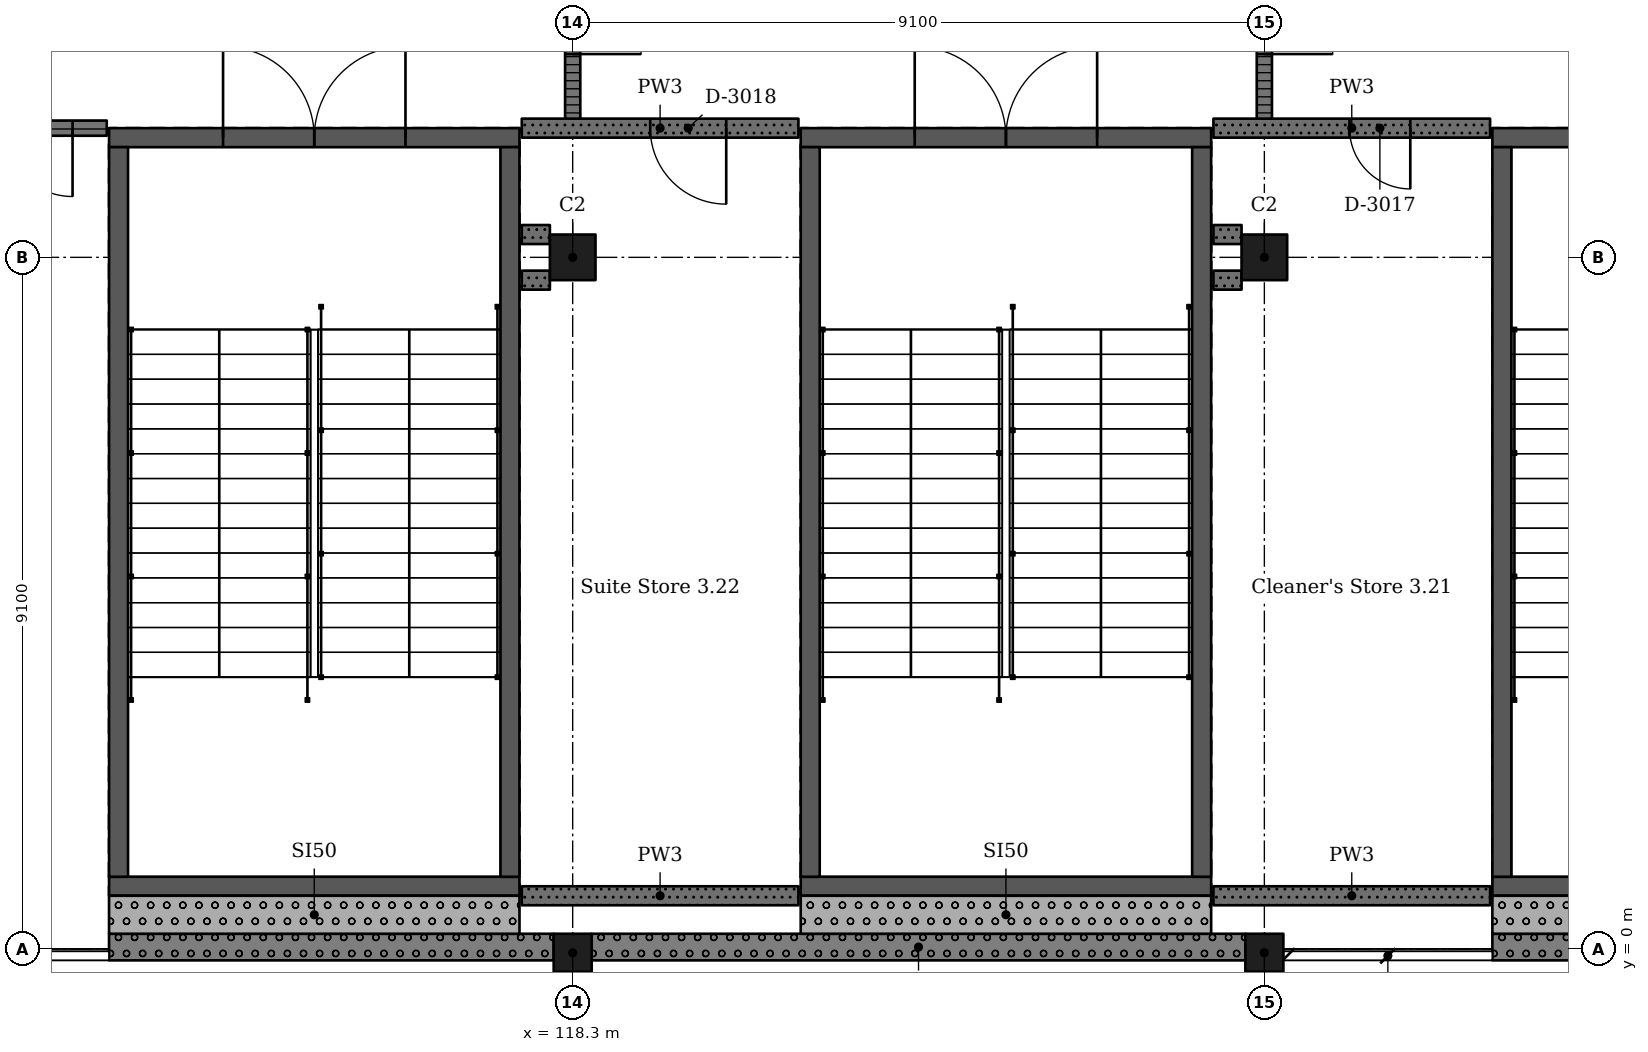
"""IFC4 building model, lengths in metres.
Left out: names, types, materials, properties, quantities, classifications, styles, units other than length and angle.
Written with IfcOpenShell. Run it as: python <this file> out.ifc"""

import sys

from ifc_helpers import new_model, si_unit, direction, frame, frame_2d, origin, origin_2d, place, context, subcontext, project, spatial, rectangle, extrude, element, fill, save


model = new_model("IFC4")
c1 = context("Model", 3, precision=1e-05, world=origin(), true_north=direction((0.0, 1.0)))
c2 = subcontext(c1, "Body", "Model", "MODEL_VIEW")
j1 = project(units=[si_unit("LENGTHUNIT", "METRE"), si_unit("PLANEANGLEUNIT", "RADIAN")], contexts=[c1])
p1 = place(None, origin())
s1 = spatial("IfcSite", under=j1, at=p1, CompositionType="ELEMENT")
p2 = place(p1, origin())
s2 = spatial("IfcBuilding", under=s1, at=p2, CompositionType="ELEMENT")
p3 = place(p2, frame((0.0, 0.0, 15.47)))
s3 = spatial("IfcBuildingStorey", under=s2, at=p3, CompositionType="ELEMENT", Elevation=15.47)
p4 = place(p3, frame((118.3, -0.05, 0.0), z_axis=(0.0, 0.0, 1.0), x_axis=(1.0, 0.0, 0.0)))
e1 = element("IfcColumn", 1, at=p4, inside=s3, PredefinedType="COLUMN", context=c2, shape_type="SweptSolid", body=[
    extrude(rectangle(XDim=0.5, YDim=0.5, at=origin_2d()), origin(), (0.0, 0.0, 1.0), 4.55),
])
p5 = place(p3, frame((118.3, 9.1, 0.0), z_axis=(0.0, 0.0, 1.0), x_axis=(1.0, 0.0, 0.0)))
e2 = element("IfcColumn", 2, at=p5, inside=s3, PredefinedType="COLUMN", context=c2, shape_type="SweptSolid", body=[
    extrude(rectangle(XDim=0.6, YDim=0.6, at=origin_2d()), origin(), (0.0, 0.0, 1.0), 4.55),
])
p6 = place(p3, frame((127.4, -0.05, 0.0), z_axis=(0.0, 0.0, 1.0), x_axis=(1.0, 0.0, 0.0)))
e3 = element("IfcColumn", 3, at=p6, inside=s3, PredefinedType="COLUMN", context=c2, shape_type="SweptSolid", body=[
    extrude(rectangle(XDim=0.5, YDim=0.5, at=origin_2d()), origin(), (0.0, 0.0, 1.0), 4.55),
])
p7 = place(p3, frame((127.4, 9.1, 0.0), z_axis=(0.0, 0.0, 1.0), x_axis=(1.0, 0.0, 0.0)))
e4 = element("IfcColumn", 4, at=p7, inside=s3, PredefinedType="COLUMN", context=c2, shape_type="SweptSolid", body=[
    extrude(rectangle(XDim=0.6, YDim=0.6, at=origin_2d()), origin(), (0.0, 0.0, 1.0), 4.55),
])
p8 = place(p3, frame((135.8, 0.825, 0.0), z_axis=(0.0, 0.0, 1.0), x_axis=(-1.0, 0.0, 0.0)))
e5 = element("IfcWall", 5, at=p8, inside=s3, PredefinedType="SHEAR", context=c2, shape_type="SweptSolid", body=[
    extrude(rectangle(XDim=5.4, YDim=0.25, at=frame_2d((2.7, 0.0))), origin(), (0.0, 0.0, 1.0), 4.55),
])
p9 = place(p3, frame((135.8, 10.675, 0.0), z_axis=(0.0, 0.0, 1.0), x_axis=(-1.0, 0.0, 0.0)))
e6 = element("IfcWall", 6, at=p9, inside=s3, PredefinedType="SHEAR", context=c2, shape_type="SweptSolid", body=[
    extrude(rectangle(XDim=5.4, YDim=0.25, at=frame_2d((2.7, 0.0))), origin(), (0.0, 0.0, 1.0), 4.55),
])
p10 = place(p9, frame((1.5, 0.0, 0.0)))
e7 = element("IfcOpeningElement", 7, at=p10, cuts=e6, PredefinedType="OPENING", context=c2, shape_type="SweptSolid", body=[
    extrude(rectangle(XDim=2.4, YDim=2.1, at=frame_2d((1.2, 1.05))), frame((0.0, 0.135, 0.0), z_axis=(0.0, -1.0, 0.0), x_axis=(1.0, 0.0, 0.0)), (0.0, 0.0, 1.0), 0.27),
])
p11 = place(p3, frame((130.525, 10.55, 0.0), z_axis=(0.0, 0.0, 1.0), x_axis=(0.0, -1.0, 0.0)))
e8 = element("IfcWall", 8, at=p11, inside=s3, PredefinedType="SHEAR", context=c2, shape_type="SweptSolid", body=[
    extrude(rectangle(XDim=9.6, YDim=0.25, at=frame_2d((4.8, 0.0))), origin(), (0.0, 0.0, 1.0), 4.55),
])
p12 = place(p3, frame((126.7, 0.825, 0.0), z_axis=(0.0, 0.0, 1.0), x_axis=(-1.0, 0.0, 0.0)))
e9 = element("IfcWall", 9, at=p12, inside=s3, PredefinedType="SHEAR", context=c2, shape_type="SweptSolid", body=[
    extrude(rectangle(XDim=5.4, YDim=0.25, at=frame_2d((2.7, 0.0))), origin(), (0.0, 0.0, 1.0), 4.55),
])
p13 = place(p3, frame((126.7, 10.675, 0.0), z_axis=(0.0, 0.0, 1.0), x_axis=(-1.0, 0.0, 0.0)))
e10 = element("IfcWall", 10, at=p13, inside=s3, PredefinedType="SHEAR", context=c2, shape_type="SweptSolid", body=[
    extrude(rectangle(XDim=5.4, YDim=0.25, at=frame_2d((2.7, 0.0))), origin(), (0.0, 0.0, 1.0), 4.55),
])
p14 = place(p13, frame((1.5, 0.0, 0.0)))
e11 = element("IfcOpeningElement", 11, at=p14, cuts=e10, PredefinedType="OPENING", context=c2, shape_type="SweptSolid", body=[
    extrude(rectangle(XDim=2.4, YDim=2.1, at=frame_2d((1.2, 1.05))), frame((0.0, 0.135, 0.0), z_axis=(0.0, -1.0, 0.0), x_axis=(1.0, 0.0, 0.0)), (0.0, 0.0, 1.0), 0.27),
])
for number, where, z_axis, x_axis in (
    (12, (121.425, 10.55, 0.0), (0.0, 0.0, 1.0), (0.0, -1.0, 0.0)),
    (13, (126.575, 10.55, 0.0), (0.0, 0.0, 1.0), (0.0, -1.0, 0.0)),
):
    element("IfcWall", number, at=place(p3, frame(where, z_axis=z_axis, x_axis=x_axis)), inside=s3, PredefinedType="SHEAR", context=c2, shape_type="SweptSolid", body=[
        extrude(rectangle(XDim=9.6, YDim=0.25, at=frame_2d((4.8, 0.0))), origin(), (0.0, 0.0, 1.0), 4.55),
    ])
p15 = place(p3, frame((117.6, 0.825, 0.0), z_axis=(0.0, 0.0, 1.0), x_axis=(-1.0, 0.0, 0.0)))
e14 = element("IfcWall", 14, at=p15, inside=s3, PredefinedType="SHEAR", context=c2, shape_type="SweptSolid", body=[
    extrude(rectangle(XDim=5.4, YDim=0.25, at=frame_2d((2.7, 0.0))), origin(), (0.0, 0.0, 1.0), 4.55),
])
p16 = place(p3, frame((117.6, 10.675, 0.0), z_axis=(0.0, 0.0, 1.0), x_axis=(-1.0, 0.0, 0.0)))
e15 = element("IfcWall", 15, at=p16, inside=s3, PredefinedType="SHEAR", context=c2, shape_type="SweptSolid", body=[
    extrude(rectangle(XDim=5.4, YDim=0.25, at=frame_2d((2.7, 0.0))), origin(), (0.0, 0.0, 1.0), 4.55),
])
p17 = place(p16, frame((1.5, 0.0, 0.0)))
e16 = element("IfcOpeningElement", 16, at=p17, cuts=e15, PredefinedType="OPENING", context=c2, shape_type="SweptSolid", body=[
    extrude(rectangle(XDim=2.4, YDim=2.1, at=frame_2d((1.2, 1.05))), frame((0.0, 0.135, 0.0), z_axis=(0.0, -1.0, 0.0), x_axis=(1.0, 0.0, 0.0)), (0.0, 0.0, 1.0), 0.27),
])
for number, where, z_axis, x_axis in (
    (17, (112.325, 10.55, 0.0), (0.0, 0.0, 1.0), (0.0, -1.0, 0.0)),
    (18, (117.475, 10.55, 0.0), (0.0, 0.0, 1.0), (0.0, -1.0, 0.0)),
):
    element("IfcWall", number, at=place(p3, frame(where, z_axis=z_axis, x_axis=x_axis)), inside=s3, PredefinedType="SHEAR", context=c2, shape_type="SweptSolid", body=[
        extrude(rectangle(XDim=9.6, YDim=0.25, at=frame_2d((4.8, 0.0))), origin(), (0.0, 0.0, 1.0), 4.55),
    ])
p18 = place(p3, frame((112.2, 0.025, 0.0), z_axis=(0.0, 0.0, 1.0), x_axis=(1.0, 0.0, 0.0)))
e19 = element("IfcWall", 19, at=p18, inside=s3, PredefinedType="SOLIDWALL", context=c2, shape_type="SweptSolid", body=[
    extrude(rectangle(XDim=5.85, YDim=0.35, at=frame_2d((2.925, 0.0))), origin(), (0.0, 0.0, 1.0), 3.55),
])
p19 = place(p3, frame((118.55, 0.025, 0.0), z_axis=(0.0, 0.0, 1.0), x_axis=(1.0, 0.0, 0.0)))
e20 = element("IfcWall", 20, at=p19, inside=s3, PredefinedType="SOLIDWALL", context=c2, shape_type="SweptSolid", body=[
    extrude(rectangle(XDim=8.6, YDim=0.35, at=frame_2d((4.3, 0.0))), origin(), (0.0, 0.0, 1.0), 3.55),
])
p20 = place(p3, frame((130.4, 0.025, 0.0), z_axis=(0.0, 0.0, 1.0), x_axis=(1.0, 0.0, 0.0)))
e21 = element("IfcWall", 21, at=p20, inside=s3, PredefinedType="SOLIDWALL", context=c2, shape_type="SweptSolid", body=[
    extrude(rectangle(XDim=5.85, YDim=0.35, at=frame_2d((2.925, 0.0))), origin(), (0.0, 0.0, 1.0), 3.55),
])
p21 = place(p3, frame((130.4, 0.45, 0.0), z_axis=(0.0, 0.0, 1.0), x_axis=(1.0, 0.0, 0.0)))
e22 = element("IfcWall", 22, at=p21, inside=s3, PredefinedType="SOLIDWALL", context=c2, shape_type="SweptSolid", body=[
    extrude(rectangle(XDim=5.4, YDim=0.5, at=frame_2d((2.7, 0.0))), origin(), (0.0, 0.0, 1.0), 4.3),
])
p22 = place(p3, frame((121.3, 0.45, 0.0), z_axis=(0.0, 0.0, 1.0), x_axis=(1.0, 0.0, 0.0)))
e23 = element("IfcWall", 23, at=p22, inside=s3, PredefinedType="SOLIDWALL", context=c2, shape_type="SweptSolid", body=[
    extrude(rectangle(XDim=5.4, YDim=0.5, at=frame_2d((2.7, 0.0))), origin(), (0.0, 0.0, 1.0), 4.3),
])
p23 = place(p3, frame((112.2, 0.45, 0.0), z_axis=(0.0, 0.0, 1.0), x_axis=(1.0, 0.0, 0.0)))
e24 = element("IfcWall", 24, at=p23, inside=s3, PredefinedType="SOLIDWALL", context=c2, shape_type="SweptSolid", body=[
    extrude(rectangle(XDim=5.4, YDim=0.5, at=frame_2d((2.7, 0.0))), origin(), (0.0, 0.0, 1.0), 4.3),
])
p24 = place(p3, frame((112.17, 10.8, 0.0), z_axis=(0.0, 0.0, 1.0), x_axis=(-1.0, 0.0, 0.0)))
e25 = element("IfcWall", 25, at=p24, inside=s3, PredefinedType="PARTITIONING", context=c2, shape_type="SweptSolid", body=[
    extrude(rectangle(XDim=2.745, YDim=0.2, at=frame_2d((1.373, 0.0))), origin(), (0.0, 0.0, 1.0), 4.3),
])
p25 = place(p24, frame((0.45, 0.0, 0.0)))
e26 = element("IfcOpeningElement", 26, at=p25, cuts=e25, PredefinedType="OPENING", context=c2, shape_type="SweptSolid", body=[
    extrude(rectangle(XDim=1.8, YDim=2.4, at=frame_2d((0.9, 1.2))), frame((0.0, 0.11, 0.0), z_axis=(0.0, -1.0, 0.0), x_axis=(1.0, 0.0, 0.0)), (0.0, 0.0, 1.0), 0.22),
])
for number, where, z_axis, x_axis in (
    (27, (117.63, 8.8, 0.0), (0.0, 0.0, 1.0), (1.0, 0.0, 0.0)),
    (28, (118.0, 9.4, 0.0), (0.0, 0.0, 1.0), (-1.0, 0.0, 0.0)),
):
    element("IfcWall", number, at=place(p3, frame(where, z_axis=z_axis, x_axis=x_axis)), inside=s3, PredefinedType="SOLIDWALL", context=c2, shape_type="SweptSolid", body=[
        extrude(rectangle(XDim=0.37, YDim=0.25, at=frame_2d((0.185, 0.0))), origin(), (0.0, 0.0, 1.0), 4.3),
    ])
p26 = place(p3, frame((117.63, 10.8, 0.0), z_axis=(0.0, 0.0, 1.0), x_axis=(1.0, 0.0, 0.0)))
e29 = element("IfcWall", 29, at=p26, inside=s3, PredefinedType="SOLIDWALL", context=c2, shape_type="SweptSolid", body=[
    extrude(rectangle(XDim=3.64, YDim=0.25, at=frame_2d((1.82, 0.0))), origin(), (0.0, 0.0, 1.0), 4.3),
])
p27 = place(p26, frame((1.69, 0.0, 0.0)))
e30 = element("IfcOpeningElement", 30, at=p27, cuts=e29, PredefinedType="OPENING", context=c2, shape_type="SweptSolid", body=[
    extrude(rectangle(XDim=1.0, YDim=2.1, at=frame_2d((0.5, 1.05))), frame((0.0, 0.135, 0.0), z_axis=(0.0, -1.0, 0.0), x_axis=(1.0, 0.0, 0.0)), (0.0, 0.0, 1.0), 0.27),
])
p28 = place(p3, frame((118.3, 10.925, 0.0), z_axis=(0.0, 0.0, 1.0), x_axis=(0.0, 1.0, 0.0)))
e31 = element("IfcWall", 31, at=p28, inside=s3, PredefinedType="PARTITIONING", context=c2, shape_type="SweptSolid", body=[
    extrude(rectangle(XDim=6.925, YDim=0.2, at=frame_2d((3.462, 0.0))), origin(), (0.0, 0.0, 1.0), 3.55),
])
p29 = place(p28, frame((0.85, 0.0, 0.0)))
e32 = element("IfcOpeningElement", 32, at=p29, cuts=e31, PredefinedType="OPENING", context=c2, shape_type="SweptSolid", body=[
    extrude(rectangle(XDim=1.8, YDim=2.4, at=frame_2d((0.9, 1.2))), frame((0.0, 0.11, 0.0), z_axis=(0.0, -1.0, 0.0), x_axis=(1.0, 0.0, 0.0)), (0.0, 0.0, 1.0), 0.22),
])
p30 = place(p28, frame((4.25, 0.0, 0.0)))
e33 = element("IfcOpeningElement", 33, at=p30, cuts=e31, PredefinedType="OPENING", context=c2, shape_type="SweptSolid", body=[
    extrude(rectangle(XDim=1.8, YDim=2.4, at=frame_2d((0.9, 1.2))), frame((0.0, 0.11, 0.0), z_axis=(0.0, -1.0, 0.0), x_axis=(1.0, 0.0, 0.0)), (0.0, 0.0, 1.0), 0.22),
])
p31 = place(p3, frame((121.27, 0.7, 0.0), z_axis=(0.0, 0.0, 1.0), x_axis=(-1.0, 0.0, 0.0)))
e34 = element("IfcWall", 34, at=p31, inside=s3, PredefinedType="SOLIDWALL", context=c2, shape_type="SweptSolid", body=[
    extrude(rectangle(XDim=3.64, YDim=0.25, at=frame_2d((1.82, 0.0))), origin(), (0.0, 0.0, 1.0), 4.3),
])
for number, where, z_axis, x_axis in (
    (35, (126.73, 8.8, 0.0), (0.0, 0.0, 1.0), (1.0, 0.0, 0.0)),
    (36, (127.1, 9.4, 0.0), (0.0, 0.0, 1.0), (-1.0, 0.0, 0.0)),
):
    element("IfcWall", number, at=place(p3, frame(where, z_axis=z_axis, x_axis=x_axis)), inside=s3, PredefinedType="SOLIDWALL", context=c2, shape_type="SweptSolid", body=[
        extrude(rectangle(XDim=0.37, YDim=0.25, at=frame_2d((0.185, 0.0))), origin(), (0.0, 0.0, 1.0), 4.3),
    ])
p32 = place(p3, frame((126.73, 10.8, 0.0), z_axis=(0.0, 0.0, 1.0), x_axis=(1.0, 0.0, 0.0)))
e37 = element("IfcWall", 37, at=p32, inside=s3, PredefinedType="SOLIDWALL", context=c2, shape_type="SweptSolid", body=[
    extrude(rectangle(XDim=3.64, YDim=0.25, at=frame_2d((1.82, 0.0))), origin(), (0.0, 0.0, 1.0), 4.3),
])
p33 = place(p32, frame((1.79, 0.0, 0.0)))
e38 = element("IfcOpeningElement", 38, at=p33, cuts=e37, PredefinedType="OPENING", context=c2, shape_type="SweptSolid", body=[
    extrude(rectangle(XDim=0.8, YDim=2.1, at=frame_2d((0.4, 1.05))), frame((0.0, 0.135, 0.0), z_axis=(0.0, -1.0, 0.0), x_axis=(1.0, 0.0, 0.0)), (0.0, 0.0, 1.0), 0.27),
])
p34 = place(p3, frame((127.4, 10.925, 0.0), z_axis=(0.0, 0.0, 1.0), x_axis=(0.0, 1.0, 0.0)))
e39 = element("IfcWall", 39, at=p34, inside=s3, PredefinedType="PARTITIONING", context=c2, shape_type="SweptSolid", body=[
    extrude(rectangle(XDim=6.925, YDim=0.2, at=frame_2d((3.462, 0.0))), origin(), (0.0, 0.0, 1.0), 3.55),
])
p35 = place(p34, frame((0.85, 0.0, 0.0)))
e40 = element("IfcOpeningElement", 40, at=p35, cuts=e39, PredefinedType="OPENING", context=c2, shape_type="SweptSolid", body=[
    extrude(rectangle(XDim=1.8, YDim=2.4, at=frame_2d((0.9, 1.2))), frame((0.0, 0.11, 0.0), z_axis=(0.0, -1.0, 0.0), x_axis=(1.0, 0.0, 0.0)), (0.0, 0.0, 1.0), 0.22),
])
p36 = place(p34, frame((4.25, 0.0, 0.0)))
e41 = element("IfcOpeningElement", 41, at=p36, cuts=e39, PredefinedType="OPENING", context=c2, shape_type="SweptSolid", body=[
    extrude(rectangle(XDim=1.8, YDim=2.4, at=frame_2d((0.9, 1.2))), frame((0.0, 0.11, 0.0), z_axis=(0.0, -1.0, 0.0), x_axis=(1.0, 0.0, 0.0)), (0.0, 0.0, 1.0), 0.22),
])
p37 = place(p3, frame((130.37, 0.7, 0.0), z_axis=(0.0, 0.0, 1.0), x_axis=(-1.0, 0.0, 0.0)))
e42 = element("IfcWall", 42, at=p37, inside=s3, PredefinedType="SOLIDWALL", context=c2, shape_type="SweptSolid", body=[
    extrude(rectangle(XDim=3.64, YDim=0.25, at=frame_2d((1.82, 0.0))), origin(), (0.0, 0.0, 1.0), 4.3),
])
p38 = place(p33, origin())
e43 = element("IfcDoor", 43, at=p38, inside=s3, OperationType="SINGLE_SWING_RIGHT", PredefinedType="DOOR", context=c2, shape_type="SweptSolid", body=[
    extrude(rectangle(XDim=0.8, YDim=2.1, at=frame_2d((0.4, 1.05))), frame((0.0, 0.025, 0.0), z_axis=(0.0, -1.0, 0.0), x_axis=(1.0, 0.0, 0.0)), (0.0, 0.0, 1.0), 0.05),
])
fill(e38, e43)
p39 = place(p27, origin())
e44 = element("IfcDoor", 44, at=p39, inside=s3, OperationType="SINGLE_SWING_RIGHT", PredefinedType="DOOR", context=c2, shape_type="SweptSolid", body=[
    extrude(rectangle(XDim=1.0, YDim=2.1, at=frame_2d((0.5, 1.05))), frame((0.0, 0.025, 0.0), z_axis=(0.0, -1.0, 0.0), x_axis=(1.0, 0.0, 0.0)), (0.0, 0.0, 1.0), 0.05),
])
fill(e30, e44)
p40 = place(p35, origin())
e45 = element("IfcDoor", 45, at=p40, inside=s3, OperationType="DOUBLE_DOOR_SINGLE_SWING", PredefinedType="DOOR", context=c2, shape_type="SweptSolid", body=[
    extrude(rectangle(XDim=1.8, YDim=2.4, at=frame_2d((0.9, 1.2))), frame((0.0, 0.025, 0.0), z_axis=(0.0, -1.0, 0.0), x_axis=(1.0, 0.0, 0.0)), (0.0, 0.0, 1.0), 0.05),
])
fill(e40, e45)
p41 = place(p29, origin())
e46 = element("IfcDoor", 46, at=p41, inside=s3, OperationType="DOUBLE_DOOR_SINGLE_SWING", PredefinedType="DOOR", context=c2, shape_type="SweptSolid", body=[
    extrude(rectangle(XDim=1.8, YDim=2.4, at=frame_2d((0.9, 1.2))), frame((0.0, 0.025, 0.0), z_axis=(0.0, -1.0, 0.0), x_axis=(1.0, 0.0, 0.0)), (0.0, 0.0, 1.0), 0.05),
])
fill(e32, e46)
p42 = place(p25, origin())
e47 = element("IfcDoor", 47, at=p42, inside=s3, OperationType="DOUBLE_DOOR_SINGLE_SWING", PredefinedType="DOOR", context=c2, shape_type="SweptSolid", body=[
    extrude(rectangle(XDim=1.8, YDim=2.4, at=frame_2d((0.9, 1.2))), frame((0.0, 0.025, 0.0), z_axis=(0.0, -1.0, 0.0), x_axis=(1.0, 0.0, 0.0)), (0.0, 0.0, 1.0), 0.05),
])
fill(e26, e47)
p43 = place(p14, origin())
e48 = element("IfcDoor", 48, at=p43, inside=s3, OperationType="DOUBLE_DOOR_SINGLE_SWING", PredefinedType="DOOR", context=c2, shape_type="SweptSolid", body=[
    extrude(rectangle(XDim=2.4, YDim=2.1, at=frame_2d((1.2, 1.05))), frame((0.0, 0.025, 0.0), z_axis=(0.0, -1.0, 0.0), x_axis=(1.0, 0.0, 0.0)), (0.0, 0.0, 1.0), 0.05),
])
fill(e11, e48)
p44 = place(p17, origin())
e49 = element("IfcDoor", 49, at=p44, inside=s3, OperationType="DOUBLE_DOOR_SINGLE_SWING", PredefinedType="DOOR", context=c2, shape_type="SweptSolid", body=[
    extrude(rectangle(XDim=2.4, YDim=2.1, at=frame_2d((1.2, 1.05))), frame((0.0, 0.025, 0.0), z_axis=(0.0, -1.0, 0.0), x_axis=(1.0, 0.0, 0.0)), (0.0, 0.0, 1.0), 0.05),
])
fill(e16, e49)
save(model, sys.argv[1])
